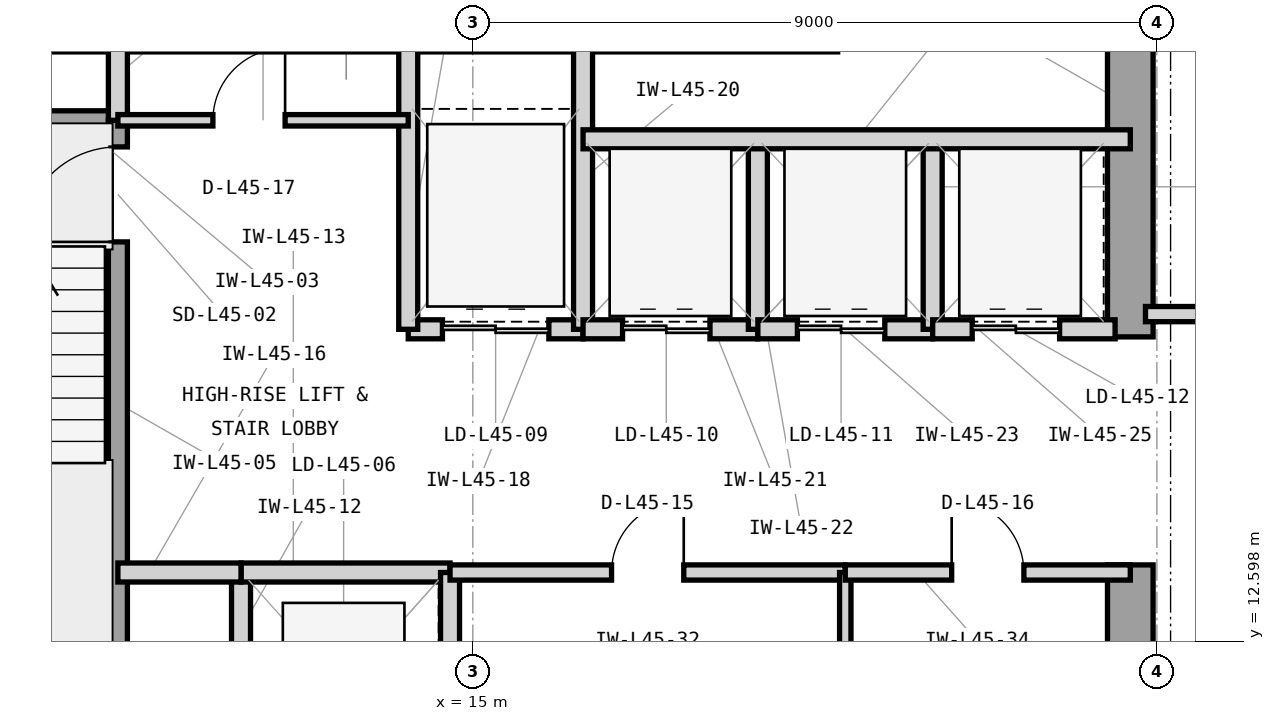
"""IFC4 building model, lengths in metres.
Left out: names, types, materials, properties, quantities, classifications, styles, units other than length and angle.
Written with IfcOpenShell. Run it as: python <this file> out.ifc"""

import sys

from ifc_helpers import new_model, si_unit, direction, frame, frame_2d, origin, place, context, subcontext, project, spatial, rectangle, extrude, element, fill, save


model = new_model("IFC4")
c1 = context("Model", 3, precision=1e-05, world=origin(), true_north=direction((0.0, 1.0)))
c2 = subcontext(c1, "Body", "Model", "MODEL_VIEW")
j1 = project(units=[si_unit("LENGTHUNIT", "METRE"), si_unit("PLANEANGLEUNIT", "RADIAN")], contexts=[c1])
p1 = place(None, origin())
s1 = spatial("IfcSite", under=j1, at=p1, CompositionType="ELEMENT")
p2 = place(p1, origin())
s2 = spatial("IfcBuilding", under=s1, at=p2, CompositionType="ELEMENT")
p3 = place(p2, frame((0.0, 0.0, 187.8)))
s3 = spatial("IfcBuildingStorey", under=s2, at=p3, CompositionType="ELEMENT", Elevation=187.8)
p4 = place(p3, frame((7.475, 20.65, 0.0), z_axis=(0.0, 0.0, 1.0), x_axis=(1.0, 0.0, 0.0)))
e1 = element("IfcWall", 1, at=p4, inside=s3, PredefinedType="SHEAR", context=c2, shape_type="SweptSolid", body=[
    extrude(rectangle(XDim=12.325, YDim=0.6, at=frame_2d((6.163, 0.0))), origin(), (0.0, 0.0, 1.0), 3.9),
])
p5 = place(p3, frame((23.65, 10.4, 0.0), z_axis=(0.0, 0.0, 1.0), x_axis=(0.0, 1.0, 0.0)))
e2 = element("IfcWall", 2, at=p5, inside=s3, PredefinedType="SHEAR", context=c2, shape_type="SweptSolid", body=[
    extrude(rectangle(XDim=3.2, YDim=0.6, at=frame_2d((1.6, 0.0))), origin(), (0.0, 0.0, 1.0), 3.9),
])
p6 = place(p3, frame((23.65, 16.6, 0.0), z_axis=(0.0, 0.0, 1.0), x_axis=(0.0, 1.0, 0.0)))
e3 = element("IfcWall", 3, at=p6, inside=s3, PredefinedType="SHEAR", context=c2, shape_type="SweptSolid", body=[
    extrude(rectangle(XDim=4.05, YDim=0.6, at=frame_2d((2.025, 0.0))), origin(), (0.0, 0.0, 1.0), 3.9),
])
p7 = place(p3, frame((7.7, 19.45, 0.0), z_axis=(0.0, 0.0, 1.0), x_axis=(1.0, 0.0, 0.0)))
e4 = element("IfcWall", 4, at=p7, inside=s3, PredefinedType="SHEAR", context=c2, shape_type="SweptSolid", body=[
    extrude(rectangle(XDim=2.755, YDim=0.25, at=frame_2d((1.377, 0.0))), origin(), (0.0, 0.0, 1.0), 3.9),
])
p8 = place(p3, frame((10.33, 12.0, 0.0), z_axis=(0.0, 0.0, 1.0), x_axis=(0.0, 1.0, 0.0)))
e5 = element("IfcWall", 5, at=p8, inside=s3, PredefinedType="SHEAR", context=c2, shape_type="SweptSolid", body=[
    extrude(rectangle(XDim=7.45, YDim=0.25, at=frame_2d((3.725, 0.0))), origin(), (0.0, 0.0, 1.0), 3.9),
])
p9 = place(p8, frame((5.85, 0.0, 0.0)))
e6 = element("IfcOpeningElement", 6, at=p9, cuts=e5, PredefinedType="OPENING", context=c2, shape_type="SweptSolid", body=[
    extrude(rectangle(XDim=1.25, YDim=2.2, at=frame_2d((0.625, 1.1))), frame((0.0, 0.135, 0.0), z_axis=(0.0, -1.0, 0.0), x_axis=(1.0, 0.0, 0.0)), (0.0, 0.0, 1.0), 0.27),
])
p10 = place(p3, frame((10.33, 19.45, 0.0), z_axis=(0.0, 0.0, 1.0), x_axis=(0.0, 1.0, 0.0)))
e7 = element("IfcWall", 7, at=p10, inside=s3, PredefinedType="PARTITIONING", context=c2, shape_type="SweptSolid", body=[
    extrude(rectangle(XDim=1.2, YDim=0.25, at=frame_2d((0.6, 0.0))), origin(), (0.0, 0.0, 1.0), 3.073),
])
p11 = place(p3, frame((11.95, 10.5, 0.0), z_axis=(0.0, 0.0, 1.0), x_axis=(0.0, 1.0, 0.0)))
e8 = element("IfcWall", 8, at=p11, inside=s3, PredefinedType="PARTITIONING", context=c2, shape_type="SweptSolid", body=[
    extrude(rectangle(XDim=3.0, YDim=0.25, at=frame_2d((1.5, 0.0))), origin(), (0.0, 0.0, 1.0), 3.69),
])
p12 = place(p3, frame((11.95, 13.5, 0.0), z_axis=(0.0, 0.0, 1.0), x_axis=(1.0, 0.0, 0.0)))
e9 = element("IfcWall", 9, at=p12, inside=s3, PredefinedType="PARTITIONING", context=c2, shape_type="SweptSolid", body=[
    extrude(rectangle(XDim=2.75, YDim=0.25, at=frame_2d((1.375, 0.0))), origin(), (0.0, 0.0, 1.0), 3.283),
])
p13 = place(p3, frame((14.7, 10.5, 0.0), z_axis=(0.0, 0.0, 1.0), x_axis=(0.0, 1.0, 0.0)))
e10 = element("IfcWall", 10, at=p13, inside=s3, PredefinedType="PARTITIONING", context=c2, shape_type="SweptSolid", body=[
    extrude(rectangle(XDim=3.0, YDim=0.25, at=frame_2d((1.5, 0.0))), origin(), (0.0, 0.0, 1.0), 3.69),
])
p14 = place(p3, frame((10.33, 13.5, 0.0), z_axis=(0.0, 0.0, 1.0), x_axis=(1.0, 0.0, 0.0)))
e11 = element("IfcWall", 11, at=p14, inside=s3, PredefinedType="PARTITIONING", context=c2, shape_type="SweptSolid", body=[
    extrude(rectangle(XDim=1.62, YDim=0.25, at=frame_2d((0.81, 0.0))), origin(), (0.0, 0.0, 1.0), 3.283),
])
p15 = place(p3, frame((14.15, 16.7, 0.0), z_axis=(0.0, 0.0, 1.0), x_axis=(1.0, 0.0, 0.0)))
e12 = element("IfcWall", 12, at=p15, inside=s3, PredefinedType="PARTITIONING", context=c2, shape_type="SweptSolid", body=[
    extrude(rectangle(XDim=2.3, YDim=0.25, at=frame_2d((1.15, 0.0))), origin(), (0.0, 0.0, 1.0), 3.283),
])
p16 = place(p15, frame((0.45, 0.0, 0.0)))
e13 = element("IfcOpeningElement", 13, at=p16, cuts=e12, PredefinedType="OPENING", context=c2, shape_type="SweptSolid", body=[
    extrude(rectangle(XDim=1.4, YDim=2.35, at=frame_2d((0.7, 1.175))), frame((0.0, 0.135, 0.0), z_axis=(0.0, -1.0, 0.0), x_axis=(1.0, 0.0, 0.0)), (0.0, 0.0, 1.0), 0.27),
])
for number, where, z_axis, x_axis in (
    (14, (14.15, 16.7, 0.0), (0.0, 0.0, 1.0), (0.0, 1.0, 0.0)),
    (15, (16.45, 16.7, 0.0), (0.0, 0.0, 1.0), (0.0, 1.0, 0.0)),
):
    element("IfcWall", number, at=place(p3, frame(where, z_axis=z_axis, x_axis=x_axis)), inside=s3, PredefinedType="PARTITIONING", context=c2, shape_type="SweptSolid", body=[
        extrude(rectangle(XDim=3.95, YDim=0.25, at=frame_2d((1.975, 0.0))), origin(), (0.0, 0.0, 1.0), 3.69),
    ])
p17 = place(p3, frame((16.45, 16.7, 0.0), z_axis=(0.0, 0.0, 1.0), x_axis=(1.0, 0.0, 0.0)))
e16 = element("IfcWall", 16, at=p17, inside=s3, PredefinedType="PARTITIONING", context=c2, shape_type="SweptSolid", body=[
    extrude(rectangle(XDim=2.3, YDim=0.25, at=frame_2d((1.15, 0.0))), origin(), (0.0, 0.0, 1.0), 3.283),
])
p18 = place(p17, frame((0.52, 0.0, 0.0)))
e17 = element("IfcOpeningElement", 17, at=p18, cuts=e16, PredefinedType="OPENING", context=c2, shape_type="SweptSolid", body=[
    extrude(rectangle(XDim=1.15, YDim=2.25, at=frame_2d((0.575, 1.125))), frame((0.0, 0.135, 0.0), z_axis=(0.0, -1.0, 0.0), x_axis=(1.0, 0.0, 0.0)), (0.0, 0.0, 1.0), 0.27),
])
p19 = place(p3, frame((18.75, 16.7, 0.0), z_axis=(0.0, 0.0, 1.0), x_axis=(0.0, 1.0, 0.0)))
e18 = element("IfcWall", 18, at=p19, inside=s3, PredefinedType="PARTITIONING", context=c2, shape_type="SweptSolid", body=[
    extrude(rectangle(XDim=2.5, YDim=0.25, at=frame_2d((1.25, 0.0))), origin(), (0.0, 0.0, 1.0), 3.69),
])
p20 = place(p3, frame((18.75, 16.7, 0.0), z_axis=(0.0, 0.0, 1.0), x_axis=(1.0, 0.0, 0.0)))
e19 = element("IfcWall", 19, at=p20, inside=s3, PredefinedType="PARTITIONING", context=c2, shape_type="SweptSolid", body=[
    extrude(rectangle(XDim=2.3, YDim=0.25, at=frame_2d((1.15, 0.0))), origin(), (0.0, 0.0, 1.0), 3.283),
])
p21 = place(p20, frame((0.52, 0.0, 0.0)))
e20 = element("IfcOpeningElement", 20, at=p21, cuts=e19, PredefinedType="OPENING", context=c2, shape_type="SweptSolid", body=[
    extrude(rectangle(XDim=1.15, YDim=2.25, at=frame_2d((0.575, 1.125))), frame((0.0, 0.135, 0.0), z_axis=(0.0, -1.0, 0.0), x_axis=(1.0, 0.0, 0.0)), (0.0, 0.0, 1.0), 0.27),
])
p22 = place(p3, frame((21.05, 16.7, 0.0), z_axis=(0.0, 0.0, 1.0), x_axis=(0.0, 1.0, 0.0)))
e21 = element("IfcWall", 21, at=p22, inside=s3, PredefinedType="PARTITIONING", context=c2, shape_type="SweptSolid", body=[
    extrude(rectangle(XDim=2.5, YDim=0.25, at=frame_2d((1.25, 0.0))), origin(), (0.0, 0.0, 1.0), 3.69),
])
p23 = place(p3, frame((21.05, 16.7, 0.0), z_axis=(0.0, 0.0, 1.0), x_axis=(1.0, 0.0, 0.0)))
e22 = element("IfcWall", 22, at=p23, inside=s3, PredefinedType="PARTITIONING", context=c2, shape_type="SweptSolid", body=[
    extrude(rectangle(XDim=2.4, YDim=0.25, at=frame_2d((1.2, 0.0))), origin(), (0.0, 0.0, 1.0), 3.283),
])
p24 = place(p23, frame((0.52, 0.0, 0.0)))
e23 = element("IfcOpeningElement", 23, at=p24, cuts=e22, PredefinedType="OPENING", context=c2, shape_type="SweptSolid", body=[
    extrude(rectangle(XDim=1.15, YDim=2.25, at=frame_2d((0.575, 1.125))), frame((0.0, 0.135, 0.0), z_axis=(0.0, -1.0, 0.0), x_axis=(1.0, 0.0, 0.0)), (0.0, 0.0, 1.0), 0.27),
])
p25 = place(p3, frame((16.45, 19.2, 0.0), z_axis=(0.0, 0.0, 1.0), x_axis=(1.0, 0.0, 0.0)))
e24 = element("IfcWall", 24, at=p25, inside=s3, PredefinedType="PARTITIONING", context=c2, shape_type="SweptSolid", body=[
    extrude(rectangle(XDim=7.2, YDim=0.25, at=frame_2d((3.6, 0.0))), origin(), (0.0, 0.0, 1.0), 3.69),
])
p26 = place(p3, frame((14.7, 13.5, 0.0), z_axis=(0.0, 0.0, 1.0), x_axis=(1.0, 0.0, 0.0)))
e25 = element("IfcWall", 25, at=p26, inside=s3, PredefinedType="PARTITIONING", context=c2, shape_type="SweptSolid", body=[
    extrude(rectangle(XDim=5.2, YDim=0.2, at=frame_2d((2.6, 0.0))), origin(), (0.0, 0.0, 1.0), 3.283),
])
p27 = place(p26, frame((2.125, 0.0, 0.0)))
e26 = element("IfcOpeningElement", 26, at=p27, cuts=e25, PredefinedType="OPENING", context=c2, shape_type="SweptSolid", body=[
    extrude(rectangle(XDim=0.95, YDim=2.1, at=frame_2d((0.475, 1.05))), frame((0.0, 0.11, 0.0), z_axis=(0.0, -1.0, 0.0), x_axis=(1.0, 0.0, 0.0)), (0.0, 0.0, 1.0), 0.22),
])
p28 = place(p3, frame((19.9, 9.88, 0.0), z_axis=(0.0, 0.0, 1.0), x_axis=(0.0, 1.0, 0.0)))
e27 = element("IfcWall", 27, at=p28, inside=s3, PredefinedType="PARTITIONING", context=c2, shape_type="SweptSolid", body=[
    extrude(rectangle(XDim=3.62, YDim=0.15, at=frame_2d((1.81, 0.0))), origin(), (0.0, 0.0, 1.0), 3.69),
])
p29 = place(p3, frame((19.9, 13.5, 0.0), z_axis=(0.0, 0.0, 1.0), x_axis=(1.0, 0.0, 0.0)))
e28 = element("IfcWall", 28, at=p29, inside=s3, PredefinedType="PARTITIONING", context=c2, shape_type="SweptSolid", body=[
    extrude(rectangle(XDim=3.75, YDim=0.2, at=frame_2d((1.875, 0.0))), origin(), (0.0, 0.0, 1.0), 3.283),
])
p30 = place(p29, frame((1.4, 0.0, 0.0)))
e29 = element("IfcOpeningElement", 29, at=p30, cuts=e28, PredefinedType="OPENING", context=c2, shape_type="SweptSolid", body=[
    extrude(rectangle(XDim=0.95, YDim=2.1, at=frame_2d((0.475, 1.05))), frame((0.0, 0.11, 0.0), z_axis=(0.0, -1.0, 0.0), x_axis=(1.0, 0.0, 0.0)), (0.0, 0.0, 1.0), 0.22),
])
p31 = place(p3, frame((10.33, 19.45, 0.0), z_axis=(0.0, 0.0, 1.0), x_axis=(1.0, 0.0, 0.0)))
e30 = element("IfcWall", 30, at=p31, inside=s3, PredefinedType="PARTITIONING", context=c2, shape_type="SweptSolid", body=[
    extrude(rectangle(XDim=3.82, YDim=0.15, at=frame_2d((1.91, 0.0))), origin(), (0.0, 0.0, 1.0), 3.69),
])
p32 = place(p31, frame((1.25, 0.0, 0.0)))
e31 = element("IfcOpeningElement", 31, at=p32, cuts=e30, PredefinedType="OPENING", context=c2, shape_type="SweptSolid", body=[
    extrude(rectangle(XDim=0.95, YDim=2.1, at=frame_2d((0.475, 1.05))), frame((0.0, 0.085, 0.0), z_axis=(0.0, -1.0, 0.0), x_axis=(1.0, 0.0, 0.0)), (0.0, 0.0, 1.0), 0.17),
])
p33 = place(p3, frame((23.85, 16.9, 0.0), z_axis=(0.0, 0.0, 1.0), x_axis=(1.0, 0.0, 0.0)))
e32 = element("IfcWall", 32, at=p33, inside=s3, PredefinedType="PARTITIONING", context=c2, shape_type="SweptSolid", body=[
    extrude(rectangle(XDim=2.85, YDim=0.2, at=frame_2d((1.425, 0.0))), origin(), (0.0, 0.0, 1.0), 3.69),
])
p34 = place(p33, frame((0.7, 0.0, 0.0)))
e33 = element("IfcOpeningElement", 33, at=p34, cuts=e32, PredefinedType="OPENING", context=c2, shape_type="SweptSolid", body=[
    extrude(rectangle(XDim=1.0, YDim=2.15, at=frame_2d((0.5, 1.075))), frame((0.0, 0.11, 0.0), z_axis=(0.0, -1.0, 0.0), x_axis=(1.0, 0.0, 0.0)), (0.0, 0.0, 1.0), 0.22),
])
p35 = place(p9, origin())
e34 = element("IfcDoor", 34, at=p35, inside=s3, OperationType="SINGLE_SWING_LEFT", PredefinedType="DOOR", context=c2, shape_type="SweptSolid", body=[
    extrude(rectangle(XDim=1.25, YDim=2.2, at=frame_2d((0.625, 1.1))), frame((0.0, 0.025, 0.0), z_axis=(0.0, -1.0, 0.0), x_axis=(1.0, 0.0, 0.0)), (0.0, 0.0, 1.0), 0.05),
])
fill(e6, e34)
p36 = place(p16, origin())
e35 = element("IfcDoor", 35, at=p36, inside=s3, OperationType="DOUBLE_DOOR_SLIDING", PredefinedType="DOOR", context=c2, shape_type="SweptSolid", body=[
    extrude(rectangle(XDim=1.4, YDim=2.35, at=frame_2d((0.7, 1.175))), frame((0.0, 0.025, 0.0), z_axis=(0.0, -1.0, 0.0), x_axis=(1.0, 0.0, 0.0)), (0.0, 0.0, 1.0), 0.05),
])
fill(e13, e35)
p37 = place(p18, origin())
e36 = element("IfcDoor", 36, at=p37, inside=s3, OperationType="DOUBLE_DOOR_SLIDING", PredefinedType="DOOR", context=c2, shape_type="SweptSolid", body=[
    extrude(rectangle(XDim=1.15, YDim=2.25, at=frame_2d((0.575, 1.125))), frame((0.0, 0.025, 0.0), z_axis=(0.0, -1.0, 0.0), x_axis=(1.0, 0.0, 0.0)), (0.0, 0.0, 1.0), 0.05),
])
fill(e17, e36)
p38 = place(p21, origin())
e37 = element("IfcDoor", 37, at=p38, inside=s3, OperationType="DOUBLE_DOOR_SLIDING", PredefinedType="DOOR", context=c2, shape_type="SweptSolid", body=[
    extrude(rectangle(XDim=1.15, YDim=2.25, at=frame_2d((0.575, 1.125))), frame((0.0, 0.025, 0.0), z_axis=(0.0, -1.0, 0.0), x_axis=(1.0, 0.0, 0.0)), (0.0, 0.0, 1.0), 0.05),
])
fill(e20, e37)
p39 = place(p24, origin())
e38 = element("IfcDoor", 38, at=p39, inside=s3, OperationType="DOUBLE_DOOR_SLIDING", PredefinedType="DOOR", context=c2, shape_type="SweptSolid", body=[
    extrude(rectangle(XDim=1.15, YDim=2.25, at=frame_2d((0.575, 1.125))), frame((0.0, 0.025, 0.0), z_axis=(0.0, -1.0, 0.0), x_axis=(1.0, 0.0, 0.0)), (0.0, 0.0, 1.0), 0.05),
])
fill(e23, e38)
p40 = place(p27, origin())
e39 = element("IfcDoor", 39, at=p40, inside=s3, OperationType="SINGLE_SWING_RIGHT", PredefinedType="DOOR", context=c2, shape_type="SweptSolid", body=[
    extrude(rectangle(XDim=0.95, YDim=2.1, at=frame_2d((0.475, 1.05))), frame((0.0, 0.025, 0.0), z_axis=(0.0, -1.0, 0.0), x_axis=(1.0, 0.0, 0.0)), (0.0, 0.0, 1.0), 0.05),
])
fill(e26, e39)
p41 = place(p30, origin())
e40 = element("IfcDoor", 40, at=p41, inside=s3, OperationType="SINGLE_SWING_LEFT", PredefinedType="DOOR", context=c2, shape_type="SweptSolid", body=[
    extrude(rectangle(XDim=0.95, YDim=2.1, at=frame_2d((0.475, 1.05))), frame((0.0, 0.025, 0.0), z_axis=(0.0, -1.0, 0.0), x_axis=(1.0, 0.0, 0.0)), (0.0, 0.0, 1.0), 0.05),
])
fill(e29, e40)
p42 = place(p32, origin())
e41 = element("IfcDoor", 41, at=p42, inside=s3, OperationType="SINGLE_SWING_RIGHT", PredefinedType="DOOR", context=c2, shape_type="SweptSolid", body=[
    extrude(rectangle(XDim=0.95, YDim=2.1, at=frame_2d((0.475, 1.05))), frame((0.0, 0.025, 0.0), z_axis=(0.0, -1.0, 0.0), x_axis=(1.0, 0.0, 0.0)), (0.0, 0.0, 1.0), 0.05),
])
fill(e31, e41)
save(model, sys.argv[1])
